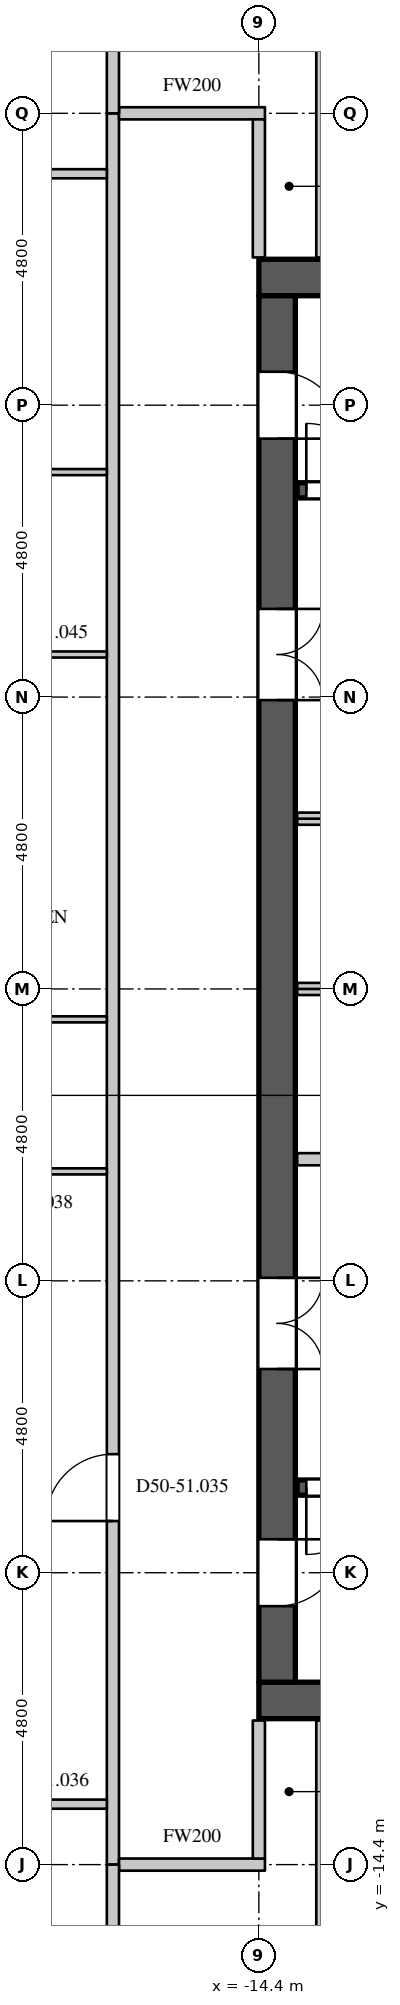
"""IFC4 building model, lengths in metres.
Left out: names, types, materials, properties, quantities, classifications, styles, units other than length and angle.
Written with IfcOpenShell. Run it as: python <this file> out.ifc"""

import sys

from ifc_helpers import new_model, si_unit, direction, frame, frame_2d, origin, place, context, subcontext, project, spatial, rectangle, extrude, element, fill, save


model = new_model("IFC4")
c1 = context("Model", 3, precision=1e-05, world=origin(), true_north=direction((0.0, 1.0)))
c2 = subcontext(c1, "Body", "Model", "MODEL_VIEW")
j1 = project(units=[si_unit("LENGTHUNIT", "METRE"), si_unit("PLANEANGLEUNIT", "RADIAN")], contexts=[c1])
p1 = place(None, origin())
s1 = spatial("IfcSite", under=j1, at=p1, CompositionType="ELEMENT")
p2 = place(p1, origin())
s2 = spatial("IfcBuilding", under=s1, at=p2, CompositionType="ELEMENT")
p3 = place(p2, frame((0.0, 0.0, 218.1)))
s3 = spatial("IfcBuildingStorey", under=s2, at=p3, CompositionType="ELEMENT", Elevation=218.1)
for number, where, z_axis, x_axis in (
    (1, (-14.4, 11.7, 0.0), (0.0, 0.0, 1.0), (1.0, 0.0, 0.0)),
    (2, (-14.4, -11.7, 0.0), (0.0, 0.0, 1.0), (1.0, 0.0, 0.0)),
):
    element("IfcWall", number, at=place(p3, frame(where, z_axis=z_axis, x_axis=x_axis)), inside=s3, PredefinedType="SHEAR", context=c2, shape_type="SweptSolid", body=[
        extrude(rectangle(XDim=28.8, YDim=0.6, at=frame_2d((14.4, 0.0))), origin(), (0.0, 0.0, 1.0), 4.2),
    ])
p4 = place(p3, frame((-14.1, -11.4, 0.0), z_axis=(0.0, 0.0, 1.0), x_axis=(0.0, 1.0, 0.0)))
e3 = element("IfcWall", 3, at=p4, inside=s3, PredefinedType="SHEAR", context=c2, shape_type="SweptSolid", body=[
    extrude(rectangle(XDim=22.8, YDim=0.6, at=frame_2d((11.4, 0.0))), origin(), (0.0, 0.0, 1.0), 4.2),
])
p5 = place(p4, frame((20.45, 0.0, 0.0)))
e4 = element("IfcOpeningElement", 4, at=p5, cuts=e3, PredefinedType="OPENING", context=c2, shape_type="SweptSolid", body=[
    extrude(rectangle(XDim=1.1, YDim=2.2, at=frame_2d((0.55, 1.1))), frame((0.0, 0.31, 0.0), z_axis=(0.0, -1.0, 0.0), x_axis=(1.0, 0.0, 0.0)), (0.0, 0.0, 1.0), 0.62),
])
p6 = place(p4, frame((1.25, 0.0, 0.0)))
e5 = element("IfcOpeningElement", 5, at=p6, cuts=e3, PredefinedType="OPENING", context=c2, shape_type="SweptSolid", body=[
    extrude(rectangle(XDim=1.1, YDim=2.2, at=frame_2d((0.55, 1.1))), frame((0.0, 0.31, 0.0), z_axis=(0.0, -1.0, 0.0), x_axis=(1.0, 0.0, 0.0)), (0.0, 0.0, 1.0), 0.62),
])
p7 = place(p4, frame((16.15, 0.0, 0.0)))
e6 = element("IfcOpeningElement", 6, at=p7, cuts=e3, PredefinedType="OPENING", context=c2, shape_type="SweptSolid", body=[
    extrude(rectangle(XDim=1.5, YDim=2.4, at=frame_2d((0.75, 1.2))), frame((0.0, 0.31, 0.0), z_axis=(0.0, -1.0, 0.0), x_axis=(1.0, 0.0, 0.0)), (0.0, 0.0, 1.0), 0.62),
])
p8 = place(p4, frame((5.15, 0.0, 0.0)))
e7 = element("IfcOpeningElement", 7, at=p8, cuts=e3, PredefinedType="OPENING", context=c2, shape_type="SweptSolid", body=[
    extrude(rectangle(XDim=1.5, YDim=2.4, at=frame_2d((0.75, 1.2))), frame((0.0, 0.31, 0.0), z_axis=(0.0, -1.0, 0.0), x_axis=(1.0, 0.0, 0.0)), (0.0, 0.0, 1.0), 0.62),
])
p9 = place(p3, frame((-16.8, -14.4, 0.0), z_axis=(0.0, 0.0, 1.0), x_axis=(0.0, 1.0, 0.0)))
e8 = element("IfcWall", 8, at=p9, inside=s3, PredefinedType="PARTITIONING", context=c2, shape_type="SweptSolid", body=[
    extrude(rectangle(XDim=28.8, YDim=0.2, at=frame_2d((14.4, 0.0))), origin(), (0.0, 0.0, 1.0), 3.95),
])
p10 = place(p9, frame((5.65, 0.0, 0.0)))
e9 = element("IfcOpeningElement", 9, at=p10, cuts=e8, PredefinedType="OPENING", context=c2, shape_type="SweptSolid", body=[
    extrude(rectangle(XDim=1.1, YDim=2.4, at=frame_2d((0.55, 1.2))), frame((0.0, 0.11, 0.0), z_axis=(0.0, -1.0, 0.0), x_axis=(1.0, 0.0, 0.0)), (0.0, 0.0, 1.0), 0.22),
])
for number, where, z_axis, x_axis in (
    (10, (-16.7, -14.4, 0.0), (0.0, 0.0, 1.0), (1.0, 0.0, 0.0)),
    (11, (-16.7, 14.4, 0.0), (0.0, 0.0, 1.0), (1.0, 0.0, 0.0)),
):
    element("IfcWall", number, at=place(p3, frame(where, z_axis=z_axis, x_axis=x_axis)), inside=s3, PredefinedType="PARTITIONING", context=c2, shape_type="SweptSolid", body=[
        extrude(rectangle(XDim=2.4, YDim=0.2, at=frame_2d((1.2, 0.0))), origin(), (0.0, 0.0, 1.0), 3.95),
    ])
for number, where, z_axis, x_axis in (
    (12, (-14.4, -14.3, 0.0), (0.0, 0.0, 1.0), (0.0, 1.0, 0.0)),
    (13, (-14.4, 12.03, 0.0), (0.0, 0.0, 1.0), (0.0, 1.0, 0.0)),
):
    element("IfcWall", number, at=place(p3, frame(where, z_axis=z_axis, x_axis=x_axis)), inside=s3, PredefinedType="PARTITIONING", context=c2, shape_type="SweptSolid", body=[
        extrude(rectangle(XDim=2.27, YDim=0.2, at=frame_2d((1.135, 0.0))), origin(), (0.0, 0.0, 1.0), 3.95),
    ])
p11 = place(p3, frame((-25.224, -13.406, 0.0), z_axis=(0.0, 0.0, 1.0), x_axis=(1.0, 0.0, 0.0)))
e14 = element("IfcWall", 14, at=p11, inside=s3, PredefinedType="PARTITIONING", context=c2, shape_type="SweptSolid", body=[
    extrude(rectangle(XDim=8.324, YDim=0.15, at=frame_2d((4.162, 0.0))), origin(), (0.0, 0.0, 1.0), 3.95),
])
p12 = place(p11, frame((6.143, 0.0, 0.0)))
e15 = element("IfcOpeningElement", 15, at=p12, cuts=e14, PredefinedType="OPENING", context=c2, shape_type="SweptSolid", body=[
    extrude(rectangle(XDim=0.95, YDim=2.2, at=frame_2d((0.475, 1.1))), frame((0.0, 0.085, 0.0), z_axis=(0.0, -1.0, 0.0), x_axis=(1.0, 0.0, 0.0)), (0.0, 0.0, 1.0), 0.17),
])
p13 = place(p3, frame((-25.224, 13.406, 0.0), z_axis=(0.0, 0.0, 1.0), x_axis=(1.0, 0.0, 0.0)))
e16 = element("IfcWall", 16, at=p13, inside=s3, PredefinedType="PARTITIONING", context=c2, shape_type="SweptSolid", body=[
    extrude(rectangle(XDim=8.324, YDim=0.15, at=frame_2d((4.162, 0.0))), origin(), (0.0, 0.0, 1.0), 3.95),
])
p14 = place(p13, frame((1.793, 0.0, 0.0)))
e17 = element("IfcOpeningElement", 17, at=p14, cuts=e16, PredefinedType="OPENING", context=c2, shape_type="SweptSolid", body=[
    extrude(rectangle(XDim=1.5, YDim=2.2, at=frame_2d((0.75, 1.1))), frame((0.0, 0.085, 0.0), z_axis=(0.0, -1.0, 0.0), x_axis=(1.0, 0.0, 0.0)), (0.0, 0.0, 1.0), 0.17),
])
for number, where, z_axis, x_axis in (
    (18, (-16.8, -19.803, 0.0), (0.0, 0.0, 1.0), (0.0, 1.0, 0.0)),
    (19, (-16.8, 14.4, 0.0), (0.0, 0.0, 1.0), (0.0, 1.0, 0.0)),
):
    element("IfcWall", number, at=place(p3, frame(where, z_axis=z_axis, x_axis=x_axis)), inside=s3, PredefinedType="PARTITIONING", context=c2, shape_type="SweptSolid", body=[
        extrude(rectangle(XDim=5.403, YDim=0.2, at=frame_2d((2.702, 0.0))), origin(), (0.0, 0.0, 1.0), 3.95),
    ])
p15 = place(p3, frame((-13.77, -2.8, 0.0), z_axis=(0.0, 0.0, 1.0), x_axis=(1.0, 0.0, 0.0)))
e20 = element("IfcWall", 20, at=p15, inside=s3, PredefinedType="PARTITIONING", context=c2, shape_type="SweptSolid", body=[
    extrude(rectangle(XDim=3.37, YDim=0.2, at=frame_2d((1.685, 0.0))), origin(), (0.0, 0.0, 1.0), 3.95),
])
p16 = place(p15, frame((1.35, 0.0, 0.0)))
e21 = element("IfcOpeningElement", 21, at=p16, cuts=e20, PredefinedType="OPENING", context=c2, shape_type="SweptSolid", body=[
    extrude(rectangle(XDim=0.6, YDim=2.0, at=frame_2d((0.3, 1.0))), frame((0.0, 0.11, 0.0), z_axis=(0.0, -1.0, 0.0), x_axis=(1.0, 0.0, 0.0)), (0.0, 0.0, 1.0), 0.22),
])
p17 = place(p3, frame((-13.77, 0.0, 0.0), z_axis=(0.0, 0.0, 1.0), x_axis=(1.0, 0.0, 0.0)))
e22 = element("IfcWall", 22, at=p17, inside=s3, PredefinedType="PARTITIONING", context=c2, shape_type="SweptSolid", body=[
    extrude(rectangle(XDim=21.57, YDim=0.2, at=frame_2d((10.785, 0.0))), origin(), (0.0, 0.0, 1.0), 3.95),
])
p18 = place(p3, frame((-13.77, 2.8, 0.0), z_axis=(0.0, 0.0, 1.0), x_axis=(1.0, 0.0, 0.0)))
e23 = element("IfcWall", 23, at=p18, inside=s3, PredefinedType="PARTITIONING", context=c2, shape_type="SweptSolid", body=[
    extrude(rectangle(XDim=5.97, YDim=0.2, at=frame_2d((2.985, 0.0))), origin(), (0.0, 0.0, 1.0), 3.95),
])
p19 = place(p18, frame((1.1, 0.0, 0.0)))
e24 = element("IfcOpeningElement", 24, at=p19, cuts=e23, PredefinedType="OPENING", context=c2, shape_type="SweptSolid", body=[
    extrude(rectangle(XDim=1.1, YDim=2.2, at=frame_2d((0.55, 1.1))), frame((0.0, 0.11, 0.0), z_axis=(0.0, -1.0, 0.0), x_axis=(1.0, 0.0, 0.0)), (0.0, 0.0, 1.0), 0.22),
])
p20 = place(p18, frame((4.1, 0.0, 0.0)))
e25 = element("IfcOpeningElement", 25, at=p20, cuts=e23, PredefinedType="OPENING", context=c2, shape_type="SweptSolid", body=[
    extrude(rectangle(XDim=1.1, YDim=2.2, at=frame_2d((0.55, 1.1))), frame((0.0, 0.11, 0.0), z_axis=(0.0, -1.0, 0.0), x_axis=(1.0, 0.0, 0.0)), (0.0, 0.0, 1.0), 0.22),
])
p21 = place(p3, frame((-13.77, -8.2, 0.0), z_axis=(0.0, 0.0, 1.0), x_axis=(1.0, 0.0, 0.0)))
e26 = element("IfcWall", 26, at=p21, inside=s3, PredefinedType="SHEAR", context=c2, shape_type="SweptSolid", body=[
    extrude(rectangle(XDim=8.495, YDim=0.25, at=frame_2d((4.248, 0.0))), origin(), (0.0, 0.0, 1.0), 3.95),
])
p22 = place(p21, frame((0.15, 0.0, 0.0)))
e27 = element("IfcOpeningElement", 27, at=p22, cuts=e26, PredefinedType="OPENING", context=c2, shape_type="SweptSolid", body=[
    extrude(rectangle(XDim=1.1, YDim=2.2, at=frame_2d((0.55, 1.1))), frame((0.0, 0.135, 0.0), z_axis=(0.0, -1.0, 0.0), x_axis=(1.0, 0.0, 0.0)), (0.0, 0.0, 1.0), 0.27),
])
p23 = place(p3, frame((-13.77, 8.2, 0.0), z_axis=(0.0, 0.0, 1.0), x_axis=(1.0, 0.0, 0.0)))
e28 = element("IfcWall", 28, at=p23, inside=s3, PredefinedType="SHEAR", context=c2, shape_type="SweptSolid", body=[
    extrude(rectangle(XDim=8.495, YDim=0.25, at=frame_2d((4.248, 0.0))), origin(), (0.0, 0.0, 1.0), 3.95),
])
p24 = place(p23, frame((0.15, 0.0, 0.0)))
e29 = element("IfcOpeningElement", 29, at=p24, cuts=e28, PredefinedType="OPENING", context=c2, shape_type="SweptSolid", body=[
    extrude(rectangle(XDim=1.1, YDim=2.2, at=frame_2d((0.55, 1.1))), frame((0.0, 0.135, 0.0), z_axis=(0.0, -1.0, 0.0), x_axis=(1.0, 0.0, 0.0)), (0.0, 0.0, 1.0), 0.27),
])
p25 = place(p3, frame((-20.65, -3.0, 0.0), z_axis=(0.0, 0.0, 1.0), x_axis=(1.0, 0.0, 0.0)))
e30 = element("IfcWall", 30, at=p25, inside=s3, PredefinedType="PARTITIONING", context=c2, shape_type="SweptSolid", body=[
    extrude(rectangle(XDim=3.75, YDim=0.1, at=frame_2d((1.875, 0.0))), origin(), (0.0, 0.0, 1.0), 3.95),
])
p26 = place(p25, frame((1.45, 0.0, 0.0)))
e31 = element("IfcOpeningElement", 31, at=p26, cuts=e30, PredefinedType="OPENING", context=c2, shape_type="SweptSolid", body=[
    extrude(rectangle(XDim=0.9, YDim=2.2, at=frame_2d((0.45, 1.1))), frame((0.0, 0.06, 0.0), z_axis=(0.0, -1.0, 0.0), x_axis=(1.0, 0.0, 0.0)), (0.0, 0.0, 1.0), 0.12),
])
p27 = place(p3, frame((-20.625, -0.5, 0.0), z_axis=(0.0, 0.0, 1.0), x_axis=(1.0, 0.0, 0.0)))
e32 = element("IfcWall", 32, at=p27, inside=s3, PredefinedType="PARTITIONING", context=c2, shape_type="SweptSolid", body=[
    extrude(rectangle(XDim=3.725, YDim=0.1, at=frame_2d((1.863, 0.0))), origin(), (0.0, 0.0, 1.0), 3.95),
])
p28 = place(p3, frame((-19.675, 5.5, 0.0), z_axis=(0.0, 0.0, 1.0), x_axis=(1.0, 0.0, 0.0)))
e33 = element("IfcWall", 33, at=p28, inside=s3, PredefinedType="PARTITIONING", context=c2, shape_type="SweptSolid", body=[
    extrude(rectangle(XDim=2.775, YDim=0.1, at=frame_2d((1.388, 0.0))), origin(), (0.0, 0.0, 1.0), 3.95),
])
p29 = place(p28, frame((0.9, 0.0, 0.0)))
e34 = element("IfcOpeningElement", 34, at=p29, cuts=e33, PredefinedType="OPENING", context=c2, shape_type="SweptSolid", body=[
    extrude(rectangle(XDim=0.9, YDim=2.2, at=frame_2d((0.45, 1.1))), frame((0.0, 0.06, 0.0), z_axis=(0.0, -1.0, 0.0), x_axis=(1.0, 0.0, 0.0)), (0.0, 0.0, 1.0), 0.12),
])
p30 = place(p3, frame((-19.675, 8.5, 0.0), z_axis=(0.0, 0.0, 1.0), x_axis=(1.0, 0.0, 0.0)))
e35 = element("IfcWall", 35, at=p30, inside=s3, PredefinedType="PARTITIONING", context=c2, shape_type="SweptSolid", body=[
    extrude(rectangle(XDim=2.775, YDim=0.1, at=frame_2d((1.388, 0.0))), origin(), (0.0, 0.0, 1.0), 3.95),
])
for number, where, z_axis, x_axis in (
    (36, (-13.406, -16.6, 0.0), (0.0, 0.0, 1.0), (0.0, 1.0, 0.0)),
    (37, (-13.406, 12.03, 0.0), (0.0, 0.0, 1.0), (0.0, 1.0, 0.0)),
):
    element("IfcWall", number, at=place(p3, frame(where, z_axis=z_axis, x_axis=x_axis)), inside=s3, PredefinedType="PARTITIONING", context=c2, shape_type="SweptSolid", body=[
        extrude(rectangle(XDim=4.57, YDim=0.1, at=frame_2d((2.285, 0.0))), origin(), (0.0, 0.0, 1.0), 3.3),
    ])
p31 = place(p24, origin())
e38 = element("IfcDoor", 38, at=p31, inside=s3, OperationType="SINGLE_SWING_LEFT", PredefinedType="DOOR", context=c2, shape_type="SweptSolid", body=[
    extrude(rectangle(XDim=1.1, YDim=2.2, at=frame_2d((0.55, 1.1))), frame((0.0, 0.025, 0.0), z_axis=(0.0, -1.0, 0.0), x_axis=(1.0, 0.0, 0.0)), (0.0, 0.0, 1.0), 0.05),
])
fill(e29, e38)
p32 = place(p22, origin())
e39 = element("IfcDoor", 39, at=p32, inside=s3, OperationType="SINGLE_SWING_RIGHT", PredefinedType="DOOR", context=c2, shape_type="SweptSolid", body=[
    extrude(rectangle(XDim=1.1, YDim=2.2, at=frame_2d((0.55, 1.1))), frame((0.0, 0.025, 0.0), z_axis=(0.0, -1.0, 0.0), x_axis=(1.0, 0.0, 0.0)), (0.0, 0.0, 1.0), 0.05),
])
fill(e27, e39)
p33 = place(p5, origin())
e40 = element("IfcDoor", 40, at=p33, inside=s3, OperationType="SINGLE_SWING_RIGHT", PredefinedType="DOOR", context=c2, shape_type="SweptSolid", body=[
    extrude(rectangle(XDim=1.1, YDim=2.2, at=frame_2d((0.55, 1.1))), frame((0.0, -0.245, 0.0), z_axis=(0.0, -1.0, 0.0), x_axis=(1.0, 0.0, 0.0)), (0.0, 0.0, 1.0), 0.05),
])
fill(e4, e40)
p34 = place(p6, origin())
e41 = element("IfcDoor", 41, at=p34, inside=s3, OperationType="SINGLE_SWING_LEFT", PredefinedType="DOOR", context=c2, shape_type="SweptSolid", body=[
    extrude(rectangle(XDim=1.1, YDim=2.2, at=frame_2d((0.55, 1.1))), frame((0.0, -0.245, 0.0), z_axis=(0.0, -1.0, 0.0), x_axis=(1.0, 0.0, 0.0)), (0.0, 0.0, 1.0), 0.05),
])
fill(e5, e41)
p35 = place(p7, origin())
e42 = element("IfcDoor", 42, at=p35, inside=s3, OperationType="DOUBLE_DOOR_SINGLE_SWING", PredefinedType="DOOR", context=c2, shape_type="SweptSolid", body=[
    extrude(rectangle(XDim=1.5, YDim=2.4, at=frame_2d((0.75, 1.2))), frame((0.0, -0.245, 0.0), z_axis=(0.0, -1.0, 0.0), x_axis=(1.0, 0.0, 0.0)), (0.0, 0.0, 1.0), 0.05),
])
fill(e6, e42)
p36 = place(p8, origin())
e43 = element("IfcDoor", 43, at=p36, inside=s3, OperationType="DOUBLE_DOOR_SINGLE_SWING", PredefinedType="DOOR", context=c2, shape_type="SweptSolid", body=[
    extrude(rectangle(XDim=1.5, YDim=2.4, at=frame_2d((0.75, 1.2))), frame((0.0, -0.245, 0.0), z_axis=(0.0, -1.0, 0.0), x_axis=(1.0, 0.0, 0.0)), (0.0, 0.0, 1.0), 0.05),
])
fill(e7, e43)
p37 = place(p10, origin())
e44 = element("IfcDoor", 44, at=p37, inside=s3, OperationType="SINGLE_SWING_LEFT", PredefinedType="DOOR", context=c2, shape_type="SweptSolid", body=[
    extrude(rectangle(XDim=1.1, YDim=2.4, at=frame_2d((0.55, 1.2))), frame((0.0, 0.025, 0.0), z_axis=(0.0, -1.0, 0.0), x_axis=(1.0, 0.0, 0.0)), (0.0, 0.0, 1.0), 0.05),
])
fill(e9, e44)
save(model, sys.argv[1])
